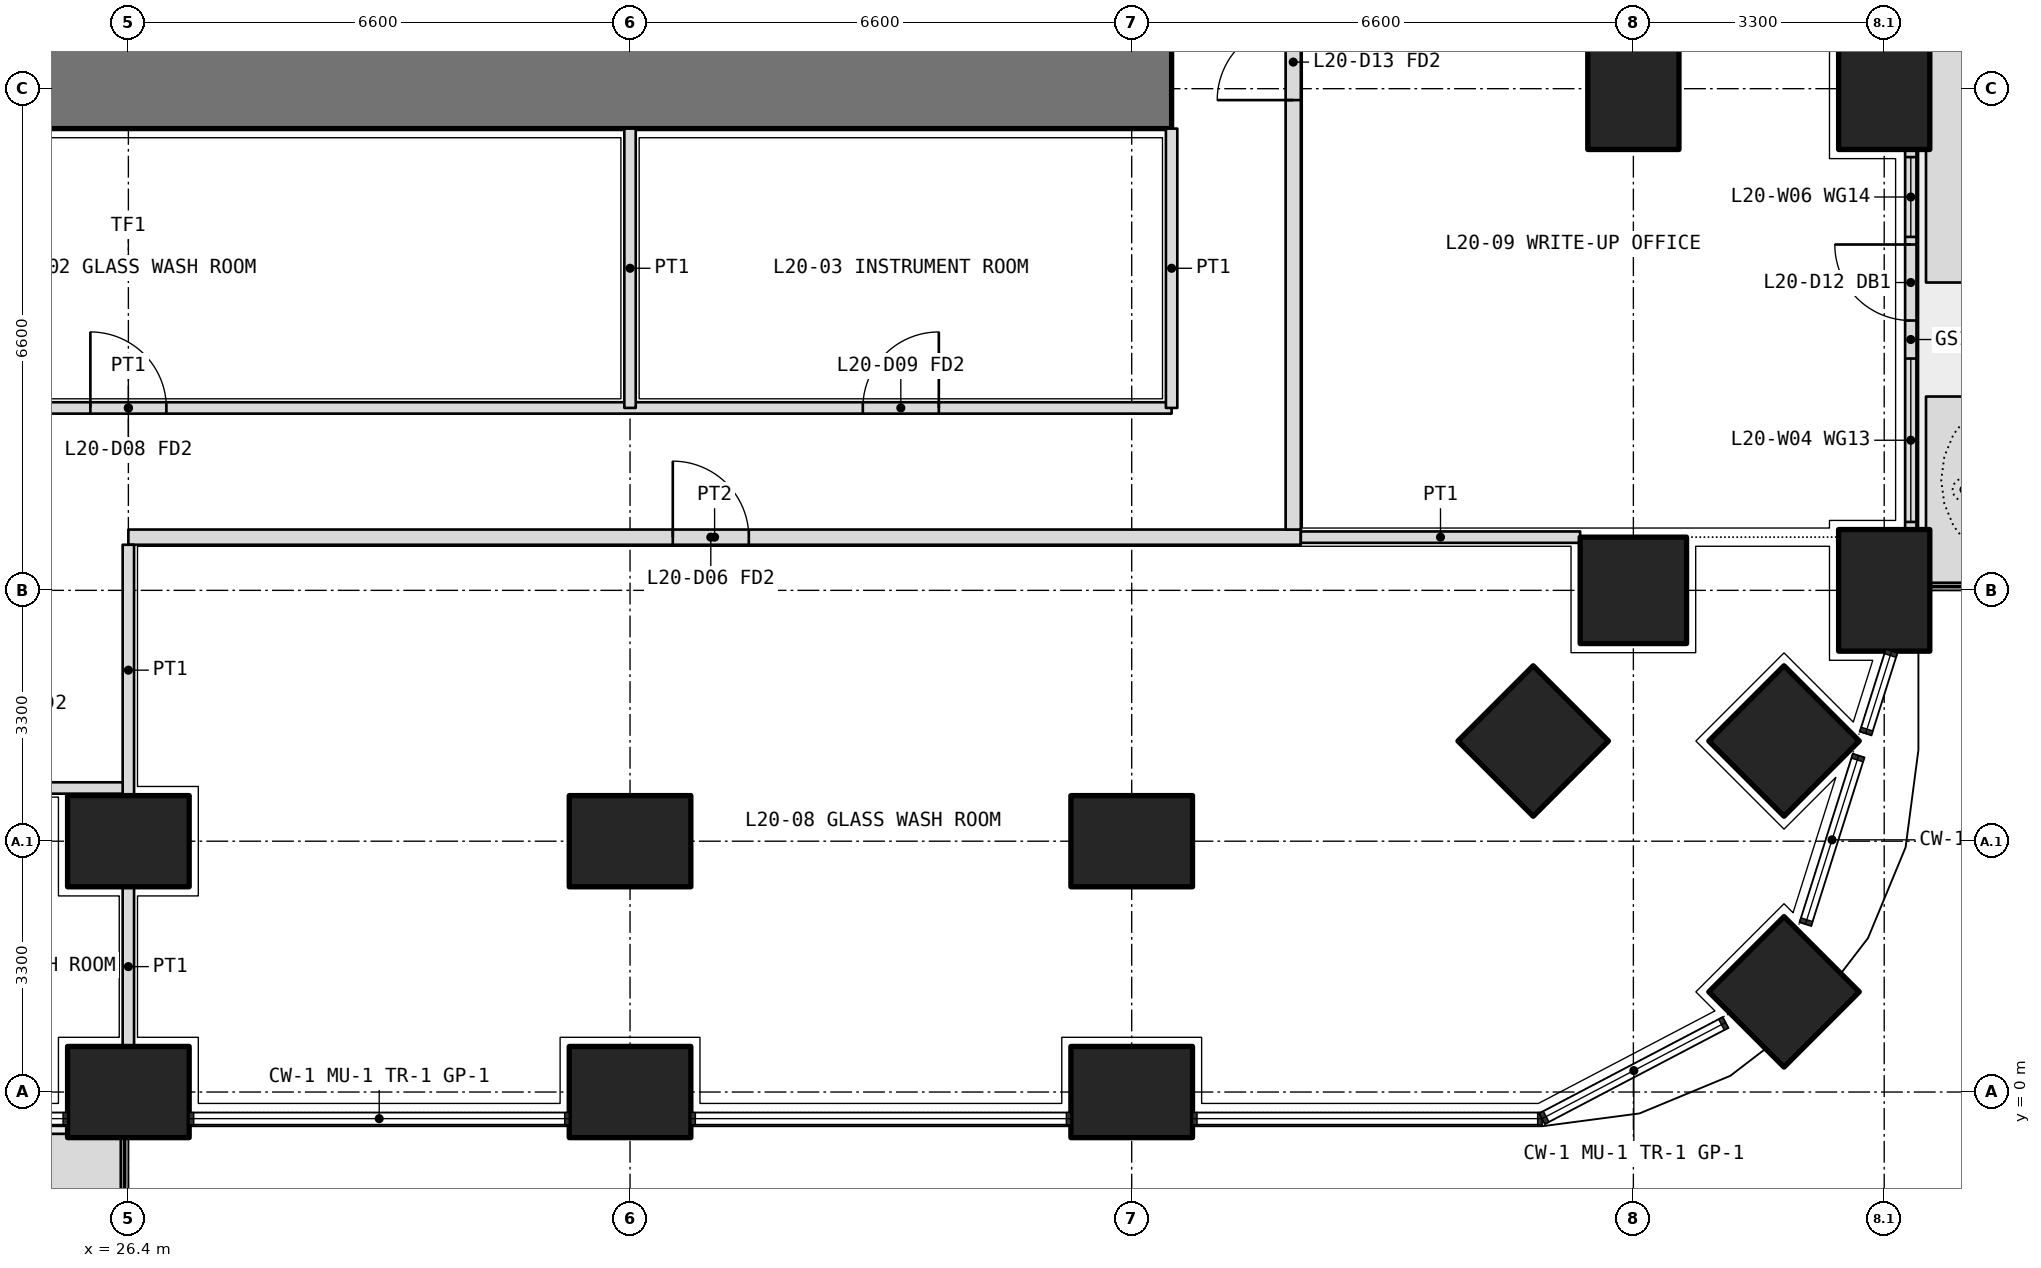
"""IFC4 building model, lengths in metres.
Left out: names, types, materials, properties, quantities, classifications, styles, units other than length and angle.
Written with IfcOpenShell. Run it as: python <this file> out.ifc"""

import sys

from ifc_helpers import new_model, si_unit, direction, frame, frame_2d, origin, origin_2d, place, context, subcontext, project, spatial, polyline, rectangle, outline, extrude, element, fill, save


model = new_model("IFC4")
c1 = context("Model", 3, precision=1e-05, world=origin(), true_north=direction((0.0, 1.0)))
c2 = subcontext(c1, "Body", "Model", "MODEL_VIEW")
j1 = project(units=[si_unit("LENGTHUNIT", "METRE"), si_unit("PLANEANGLEUNIT", "RADIAN")], contexts=[c1])
p1 = place(None, origin())
s1 = spatial("IfcSite", under=j1, at=p1, CompositionType="ELEMENT")
p2 = place(p1, origin())
s2 = spatial("IfcBuilding", under=s1, at=p2, CompositionType="ELEMENT")
p3 = place(p2, frame((0.0, 0.0, 90.6)))
s3 = spatial("IfcBuildingStorey", under=s2, at=p3, CompositionType="ELEMENT", Elevation=90.6)
p4 = place(p3, frame((48.182, 1.318, 0.0), z_axis=(0.0, 0.0, 1.0), x_axis=(0.707106781187, 0.707106781187, 0.0)))
e1 = element("IfcColumn", 1, at=p4, inside=s3, PredefinedType="COLUMN", context=c2, shape_type="SweptSolid", body=[
    extrude(rectangle(XDim=1.4, YDim=1.4, at=origin_2d()), origin(), (0.0, 0.0, 1.0), 4.2),
])
for number, where, z_axis, x_axis in (
    (2, (26.4, 0.0, 0.0), (0.0, 0.0, 1.0), (1.0, 0.0, 0.0)),
    (3, (33.0, 0.0, 0.0), (0.0, 0.0, 1.0), (1.0, 0.0, 0.0)),
    (4, (39.6, 0.0, 0.0), (0.0, 0.0, 1.0), (1.0, 0.0, 0.0)),
    (5, (49.5, 6.6, 0.0), (0.0, 0.0, 1.0), (0.0, 1.0, 0.0)),
    (6, (49.5, 13.2, 0.0), (0.0, 0.0, 1.0), (0.0, 1.0, 0.0)),
):
    element("IfcColumn", number, at=place(p3, frame(where, z_axis=z_axis, x_axis=x_axis)), inside=s3, PredefinedType="COLUMN", context=c2, shape_type="SweptSolid", body=[
        extrude(rectangle(XDim=1.6, YDim=1.2, at=origin_2d()), origin(), (0.0, 0.0, 1.0), 4.2),
    ])
for number, where, z_axis, x_axis in (
    (7, (46.2, 6.6, 0.0), (0.0, 0.0, 1.0), (1.0, 0.0, 0.0)),
    (8, (48.182, 4.618, 0.0), (0.0, 0.0, 1.0), (0.707, 0.707, 0.0)),
):
    element("IfcColumn", number, at=place(p3, frame(where, z_axis=z_axis, x_axis=x_axis)), inside=s3, PredefinedType="COLUMN", context=c2, shape_type="SweptSolid", body=[
        extrude(rectangle(XDim=1.4, YDim=1.4, at=origin_2d()), origin(), (0.0, 0.0, 1.0), 4.2),
    ])
for number, where, z_axis, x_axis in (
    (9, (26.4, 3.3, 0.0), (0.0, 0.0, 1.0), (1.0, 0.0, 0.0)),
    (10, (33.0, 3.3, 0.0), (0.0, 0.0, 1.0), (1.0, 0.0, 0.0)),
    (11, (39.6, 3.3, 0.0), (0.0, 0.0, 1.0), (1.0, 0.0, 0.0)),
):
    element("IfcColumn", number, at=place(p3, frame(where, z_axis=z_axis, x_axis=x_axis)), inside=s3, PredefinedType="COLUMN", context=c2, shape_type="SweptSolid", body=[
        extrude(rectangle(XDim=1.6, YDim=1.2, at=origin_2d()), origin(), (0.0, 0.0, 1.0), 4.2),
    ])
p5 = place(p3, frame((44.882, 4.618, 0.0), z_axis=(0.0, 0.0, 1.0), x_axis=(0.707106781187, 0.707106781187, 0.0)))
e12 = element("IfcColumn", 12, at=p5, inside=s3, PredefinedType="COLUMN", context=c2, shape_type="SweptSolid", body=[
    extrude(rectangle(XDim=1.4, YDim=1.4, at=origin_2d()), origin(), (0.0, 0.0, 1.0), 4.2),
])
p6 = place(p3, frame((46.2, 13.2, 0.0), z_axis=(0.0, 0.0, 1.0), x_axis=(0.0, 1.0, 0.0)))
e13 = element("IfcColumn", 13, at=p6, inside=s3, PredefinedType="COLUMN", context=c2, shape_type="SweptSolid", body=[
    extrude(rectangle(XDim=1.6, YDim=1.2, at=origin_2d()), origin(), (0.0, 0.0, 1.0), 4.2),
])
p7 = place(p3, origin())
e14 = element("IfcWall", 14, at=p7, inside=s3, PredefinedType="USERDEFINED", context=c2, shape_type="SweptSolid", body=[
    extrude(outline(polyline([(17.25, -1.55), (26.3, -1.55), (26.3, -0.55), (17.25, -0.55), (17.25, -1.55)]), holes=[polyline([(17.4, -1.4), (26.15, -1.4), (26.15, -0.7), (17.4, -0.7), (17.4, -1.4)])]), origin(), (0.0, 0.0, 1.0), 1.05),
])
p8 = place(p3, origin())
e15 = element("IfcWall", 15, at=p8, inside=s3, PredefinedType="USERDEFINED", context=c2, shape_type="SweptSolid", body=[
    extrude(outline(polyline([(50.05, 6.7), (51.05, 6.7), (51.05, 9.15), (50.05, 9.15), (50.05, 6.7)]), holes=[polyline([(50.2, 6.85), (50.9, 6.85), (50.9, 9.0), (50.2, 9.0), (50.2, 6.85)])]), origin(), (0.0, 0.0, 1.0), 1.05),
])
p9 = place(p3, origin())
e16 = element("IfcWall", 16, at=p9, inside=s3, PredefinedType="USERDEFINED", context=c2, shape_type="SweptSolid", body=[
    extrude(outline(polyline([(50.05, 10.65), (51.05, 10.65), (51.05, 19.7), (50.05, 19.7), (50.05, 10.65)]), holes=[polyline([(50.2, 10.8), (50.9, 10.8), (50.9, 19.55), (50.2, 19.55), (50.2, 10.8)])]), origin(), (0.0, 0.0, 1.0), 1.05),
])
p10 = place(p3, frame((49.85, 7.4, 0.0), z_axis=(0.0, 0.0, 1.0), x_axis=(0.0, 1.0, 0.0)))
e17 = element("IfcWall", 17, at=p10, inside=s3, PredefinedType="SOLIDWALL", context=c2, shape_type="SweptSolid", body=[
    extrude(rectangle(XDim=5.0, YDim=0.15, at=frame_2d((2.5, 0.0))), origin(), (0.0, 0.0, 1.0), 2.7),
])
p11 = place(p10, frame((2.75, 0.0, 0.0)))
e18 = element("IfcOpeningElement", 18, at=p11, cuts=e17, PredefinedType="OPENING", context=c2, shape_type="SweptSolid", body=[
    extrude(rectangle(XDim=1.0, YDim=2.4, at=frame_2d((0.5, 1.2))), frame((0.0, 0.085, 0.0), z_axis=(0.0, -1.0, 0.0), x_axis=(1.0, 0.0, 0.0)), (0.0, 0.0, 1.0), 0.17),
])
p12 = place(p10, frame((0.1, 0.0, 0.1)))
e19 = element("IfcOpeningElement", 19, at=p12, cuts=e17, PredefinedType="OPENING", context=c2, shape_type="SweptSolid", body=[
    extrude(rectangle(XDim=2.15, YDim=2.3, at=frame_2d((1.075, 1.15))), frame((0.0, 0.085, 0.0), z_axis=(0.0, -1.0, 0.0), x_axis=(1.0, 0.0, 0.0)), (0.0, 0.0, 1.0), 0.17),
])
p13 = place(p10, frame((3.85, 0.0, 0.1)))
e20 = element("IfcOpeningElement", 20, at=p13, cuts=e17, PredefinedType="OPENING", context=c2, shape_type="SweptSolid", body=[
    extrude(rectangle(XDim=1.05, YDim=2.3, at=frame_2d((0.525, 1.15))), frame((0.0, 0.085, 0.0), z_axis=(0.0, -1.0, 0.0), x_axis=(1.0, 0.0, 0.0)), (0.0, 0.0, 1.0), 0.17),
])
p14 = place(p3, frame((12.675, 13.2, 0.0), z_axis=(0.0, 0.0, 1.0), x_axis=(1.0, 0.0, 0.0)))
e21 = element("IfcWall", 21, at=p14, inside=s3, PredefinedType="SHEAR", context=c2, shape_type="SweptSolid", body=[
    extrude(rectangle(XDim=27.45, YDim=1.05, at=frame_2d((13.725, 0.0))), origin(), (0.0, 0.0, 1.0), 4.2),
])
p15 = place(p3, frame((12.675, 9.0, 0.0), z_axis=(0.0, 0.0, 1.0), x_axis=(1.0, 0.0, 0.0)))
e22 = element("IfcWall", 22, at=p15, inside=s3, PredefinedType="PARTITIONING", context=c2, shape_type="SweptSolid", body=[
    extrude(rectangle(XDim=27.45, YDim=0.15, at=frame_2d((13.725, 0.0))), origin(), (0.0, 0.0, 1.0), 2.85),
])
p16 = place(p15, frame((3.062, 0.0, 0.0)))
e23 = element("IfcOpeningElement", 23, at=p16, cuts=e22, PredefinedType="OPENING", context=c2, shape_type="SweptSolid", body=[
    extrude(rectangle(XDim=1.0, YDim=2.1, at=frame_2d((0.5, 1.05))), frame((0.0, 0.085, 0.0), z_axis=(0.0, -1.0, 0.0), x_axis=(1.0, 0.0, 0.0)), (0.0, 0.0, 1.0), 0.17),
])
p17 = place(p15, frame((13.225, 0.0, 0.0)))
e24 = element("IfcOpeningElement", 24, at=p17, cuts=e22, PredefinedType="OPENING", context=c2, shape_type="SweptSolid", body=[
    extrude(rectangle(XDim=1.0, YDim=2.1, at=frame_2d((0.5, 1.05))), frame((0.0, 0.085, 0.0), z_axis=(0.0, -1.0, 0.0), x_axis=(1.0, 0.0, 0.0)), (0.0, 0.0, 1.0), 0.17),
])
p18 = place(p15, frame((23.387, 0.0, 0.0)))
e25 = element("IfcOpeningElement", 25, at=p18, cuts=e22, PredefinedType="OPENING", context=c2, shape_type="SweptSolid", body=[
    extrude(rectangle(XDim=1.0, YDim=2.1, at=frame_2d((0.5, 1.05))), frame((0.0, 0.085, 0.0), z_axis=(0.0, -1.0, 0.0), x_axis=(1.0, 0.0, 0.0)), (0.0, 0.0, 1.0), 0.17),
])
for number, where, z_axis, x_axis in (
    (26, (40.125, 12.675, 0.0), (0.0, 0.0, 1.0), (0.0, -1.0, 0.0)),
    (27, (33.0, 12.675, 0.0), (0.0, 0.0, 1.0), (0.0, -1.0, 0.0)),
):
    element("IfcWall", number, at=place(p3, frame(where, z_axis=z_axis, x_axis=x_axis)), inside=s3, PredefinedType="PARTITIONING", context=c2, shape_type="SweptSolid", body=[
        extrude(rectangle(XDim=3.675, YDim=0.15, at=frame_2d((1.837, 0.0))), origin(), (0.0, 0.0, 1.0), 2.85),
    ])
p19 = place(p3, frame((26.4, 7.3, 0.0), z_axis=(0.0, 0.0, 1.0), x_axis=(1.0, 0.0, 0.0)))
e28 = element("IfcWall", 28, at=p19, inside=s3, PredefinedType="PARTITIONING", context=c2, shape_type="SweptSolid", body=[
    extrude(rectangle(XDim=15.425, YDim=0.2, at=frame_2d((7.712, 0.0))), origin(), (0.0, 0.0, 1.0), 2.85),
])
p20 = place(p19, frame((7.163, 0.0, 0.0)))
e29 = element("IfcOpeningElement", 29, at=p20, cuts=e28, PredefinedType="OPENING", context=c2, shape_type="SweptSolid", body=[
    extrude(rectangle(XDim=1.0, YDim=2.1, at=frame_2d((0.5, 1.05))), frame((0.0, 0.11, 0.0), z_axis=(0.0, -1.0, 0.0), x_axis=(1.0, 0.0, 0.0)), (0.0, 0.0, 1.0), 0.22),
])
p21 = place(p3, frame((41.725, 7.4, 0.0), z_axis=(0.0, 0.0, 1.0), x_axis=(0.0, 1.0, 0.0)))
e30 = element("IfcWall", 30, at=p21, inside=s3, PredefinedType="PARTITIONING", context=c2, shape_type="SweptSolid", body=[
    extrude(rectangle(XDim=27.625, YDim=0.2, at=frame_2d((13.812, 0.0))), origin(), (0.0, 0.0, 1.0), 2.85),
])
p22 = place(p21, frame((5.65, 0.0, 0.0)))
e31 = element("IfcOpeningElement", 31, at=p22, cuts=e30, PredefinedType="OPENING", context=c2, shape_type="SweptSolid", body=[
    extrude(rectangle(XDim=1.0, YDim=2.1, at=frame_2d((0.5, 1.05))), frame((0.0, 0.11, 0.0), z_axis=(0.0, -1.0, 0.0), x_axis=(1.0, 0.0, 0.0)), (0.0, 0.0, 1.0), 0.22),
])
p23 = place(p21, frame((13.4, 0.0, 0.0)))
e32 = element("IfcOpeningElement", 32, at=p23, cuts=e30, PredefinedType="OPENING", context=c2, shape_type="SweptSolid", body=[
    extrude(rectangle(XDim=1.0, YDim=2.1, at=frame_2d((0.5, 1.05))), frame((0.0, 0.11, 0.0), z_axis=(0.0, -1.0, 0.0), x_axis=(1.0, 0.0, 0.0)), (0.0, 0.0, 1.0), 0.22),
])
p24 = place(p21, frame((16.75, 0.0, 0.0)))
e33 = element("IfcOpeningElement", 33, at=p24, cuts=e30, PredefinedType="OPENING", context=c2, shape_type="SweptSolid", body=[
    extrude(rectangle(XDim=0.9, YDim=2.1, at=frame_2d((0.45, 1.05))), frame((0.0, 0.11, 0.0), z_axis=(0.0, -1.0, 0.0), x_axis=(1.0, 0.0, 0.0)), (0.0, 0.0, 1.0), 0.22),
])
p25 = place(p21, frame((21.8, 0.0, 0.0)))
e34 = element("IfcOpeningElement", 34, at=p25, cuts=e30, PredefinedType="OPENING", context=c2, shape_type="SweptSolid", body=[
    extrude(rectangle(XDim=1.0, YDim=2.1, at=frame_2d((0.5, 1.05))), frame((0.0, 0.11, 0.0), z_axis=(0.0, -1.0, 0.0), x_axis=(1.0, 0.0, 0.0)), (0.0, 0.0, 1.0), 0.22),
])
p26 = place(p21, frame((26.163, 0.0, 0.0)))
e35 = element("IfcOpeningElement", 35, at=p26, cuts=e30, PredefinedType="OPENING", context=c2, shape_type="SweptSolid", body=[
    extrude(rectangle(XDim=1.0, YDim=2.1, at=frame_2d((0.5, 1.05))), frame((0.0, 0.11, 0.0), z_axis=(0.0, -1.0, 0.0), x_axis=(1.0, 0.0, 0.0)), (0.0, 0.0, 1.0), 0.22),
])
p27 = place(p3, frame((45.5, 7.3, 0.0), z_axis=(0.0, 0.0, 1.0), x_axis=(-1.0, 0.0, 0.0)))
e36 = element("IfcWall", 36, at=p27, inside=s3, PredefinedType="PARTITIONING", context=c2, shape_type="SweptSolid", body=[
    extrude(rectangle(XDim=3.675, YDim=0.15, at=frame_2d((1.837, 0.0))), origin(), (0.0, 0.0, 1.0), 2.85),
])
p28 = place(p3, frame((23.1, 4.0, 0.0), z_axis=(0.0, 0.0, 1.0), x_axis=(1.0, 0.0, 0.0)))
e37 = element("IfcWall", 37, at=p28, inside=s3, PredefinedType="PARTITIONING", context=c2, shape_type="SweptSolid", body=[
    extrude(rectangle(XDim=3.3, YDim=0.15, at=frame_2d((1.65, 0.0))), origin(), (0.0, 0.0, 1.0), 2.85),
])
p29 = place(p28, frame((1.15, 0.0, 0.0)))
e38 = element("IfcOpeningElement", 38, at=p29, cuts=e37, PredefinedType="OPENING", context=c2, shape_type="SweptSolid", body=[
    extrude(rectangle(XDim=1.0, YDim=2.1, at=frame_2d((0.5, 1.05))), frame((0.0, 0.085, 0.0), z_axis=(0.0, -1.0, 0.0), x_axis=(1.0, 0.0, 0.0)), (0.0, 0.0, 1.0), 0.17),
])
p30 = place(p3, frame((26.4, 0.6, 0.0), z_axis=(0.0, 0.0, 1.0), x_axis=(0.0, 1.0, 0.0)))
e39 = element("IfcWall", 39, at=p30, inside=s3, PredefinedType="PARTITIONING", context=c2, shape_type="SweptSolid", body=[
    extrude(rectangle(XDim=2.1, YDim=0.15, at=frame_2d((1.05, 0.0))), origin(), (0.0, 0.0, 1.0), 2.85),
])
p31 = place(p3, frame((26.4, 3.9, 0.0), z_axis=(0.0, 0.0, 1.0), x_axis=(0.0, 1.0, 0.0)))
e40 = element("IfcWall", 40, at=p31, inside=s3, PredefinedType="PARTITIONING", context=c2, shape_type="SweptSolid", body=[
    extrude(rectangle(XDim=3.3, YDim=0.15, at=frame_2d((1.65, 0.0))), origin(), (0.0, 0.0, 1.0), 2.85),
])
p32 = place(p11, origin())
e41 = element("IfcDoor", 41, at=p32, inside=s3, OperationType="SINGLE_SWING_RIGHT", PredefinedType="DOOR", context=c2, shape_type="SweptSolid", body=[
    extrude(rectangle(XDim=1.0, YDim=2.4, at=frame_2d((0.5, 1.2))), frame((0.0, 0.025, 0.0), z_axis=(0.0, -1.0, 0.0), x_axis=(1.0, 0.0, 0.0)), (0.0, 0.0, 1.0), 0.05),
])
fill(e18, e41)
p33 = place(p12, origin())
e42 = element("IfcWindow", 42, at=p33, inside=s3, PartitioningType="SINGLE_PANEL", PredefinedType="WINDOW", context=c2, shape_type="SweptSolid", body=[
    extrude(rectangle(XDim=2.15, YDim=2.3, at=frame_2d((1.075, 1.15))), frame((0.0, 0.03, 0.0), z_axis=(0.0, -1.0, 0.0), x_axis=(1.0, 0.0, 0.0)), (0.0, 0.0, 1.0), 0.06),
])
fill(e19, e42)
p34 = place(p13, origin())
e43 = element("IfcWindow", 43, at=p34, inside=s3, PartitioningType="SINGLE_PANEL", PredefinedType="WINDOW", context=c2, shape_type="SweptSolid", body=[
    extrude(rectangle(XDim=1.05, YDim=2.3, at=frame_2d((0.525, 1.15))), frame((0.0, 0.03, 0.0), z_axis=(0.0, -1.0, 0.0), x_axis=(1.0, 0.0, 0.0)), (0.0, 0.0, 1.0), 0.06),
])
fill(e20, e43)
p35 = place(p17, origin())
e44 = element("IfcDoor", 44, at=p35, inside=s3, OperationType="SINGLE_SWING_LEFT", PredefinedType="DOOR", context=c2, shape_type="SweptSolid", body=[
    extrude(rectangle(XDim=1.0, YDim=2.1, at=frame_2d((0.5, 1.05))), frame((0.0, 0.025, 0.0), z_axis=(0.0, -1.0, 0.0), x_axis=(1.0, 0.0, 0.0)), (0.0, 0.0, 1.0), 0.05),
])
fill(e24, e44)
p36 = place(p18, origin())
e45 = element("IfcDoor", 45, at=p36, inside=s3, OperationType="SINGLE_SWING_RIGHT", PredefinedType="DOOR", context=c2, shape_type="SweptSolid", body=[
    extrude(rectangle(XDim=1.0, YDim=2.1, at=frame_2d((0.5, 1.05))), frame((0.0, 0.025, 0.0), z_axis=(0.0, -1.0, 0.0), x_axis=(1.0, 0.0, 0.0)), (0.0, 0.0, 1.0), 0.05),
])
fill(e25, e45)
p37 = place(p20, origin())
e46 = element("IfcDoor", 46, at=p37, inside=s3, OperationType="SINGLE_SWING_LEFT", PredefinedType="DOOR", context=c2, shape_type="SweptSolid", body=[
    extrude(rectangle(XDim=1.0, YDim=2.1, at=frame_2d((0.5, 1.05))), frame((0.0, 0.025, 0.0), z_axis=(0.0, -1.0, 0.0), x_axis=(1.0, 0.0, 0.0)), (0.0, 0.0, 1.0), 0.05),
])
fill(e29, e46)
p38 = place(p22, origin())
e47 = element("IfcDoor", 47, at=p38, inside=s3, OperationType="SINGLE_SWING_LEFT", PredefinedType="DOOR", context=c2, shape_type="SweptSolid", body=[
    extrude(rectangle(XDim=1.0, YDim=2.1, at=frame_2d((0.5, 1.05))), frame((0.0, 0.025, 0.0), z_axis=(0.0, -1.0, 0.0), x_axis=(1.0, 0.0, 0.0)), (0.0, 0.0, 1.0), 0.05),
])
fill(e31, e47)
save(model, sys.argv[1])
